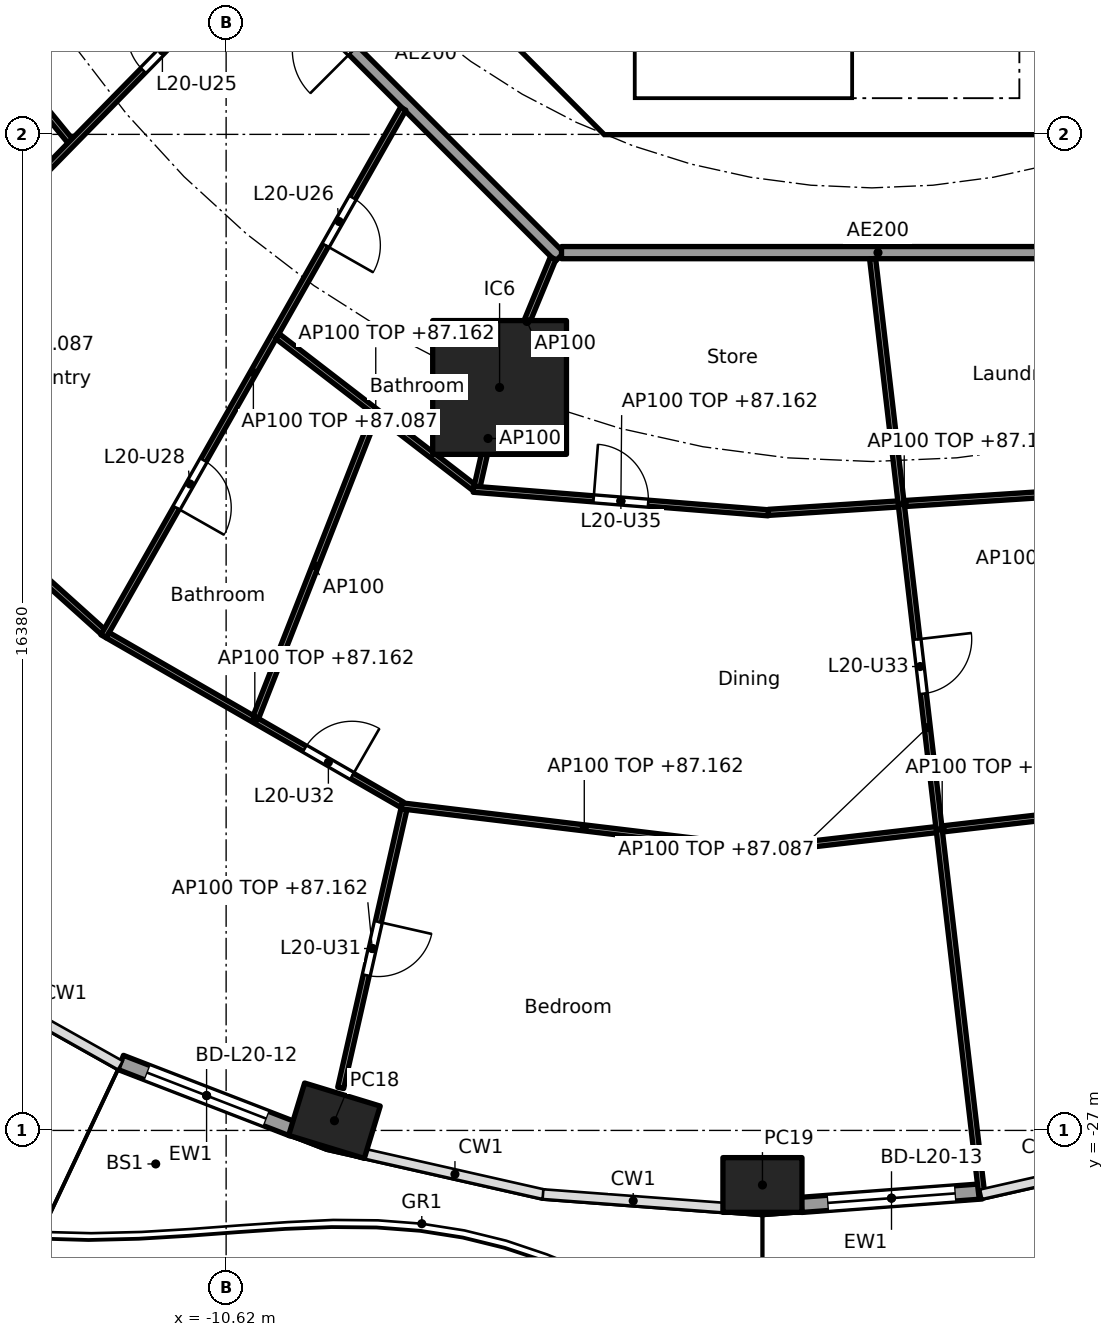
"""IFC4 building model, lengths in metres.
Left out: names, types, materials, properties, quantities, classifications, styles, units other than length and angle.
Written with IfcOpenShell. Run it as: python <this file> out.ifc"""

import sys

from ifc_helpers import new_model, si_unit, direction, frame, frame_2d, origin, origin_2d, place, context, subcontext, project, spatial, polyline, rectangle, hollow_rectangle, outline, extrude, element, fill, save


model = new_model("IFC4")
c1 = context("Model", 3, precision=1e-05, world=origin(), true_north=direction((0.0, 1.0)))
c2 = subcontext(c1, "Body", "Model", "MODEL_VIEW")
j1 = project(units=[si_unit("LENGTHUNIT", "METRE"), si_unit("PLANEANGLEUNIT", "RADIAN")], contexts=[c1])
p1 = place(None, origin())
s1 = spatial("IfcSite", under=j1, at=p1, CompositionType="ELEMENT")
p2 = place(p1, origin())
s2 = spatial("IfcBuilding", under=s1, at=p2, CompositionType="ELEMENT")
p3 = place(p2, frame((0.0, 0.0, 84.4)))
s3 = spatial("IfcBuildingStorey", under=s2, at=p3, CompositionType="ELEMENT", Elevation=84.4)
for number, where, z_axis, x_axis in (
    (1, (-8.839, -26.841, 0.0), (0.0, 0.0, 1.0), (0.957, -0.292, 0.0)),
    (2, (-1.8, -27.897, 0.0), (0.0, 0.0, 1.0), (1.0, 0.0, 0.0)),
):
    element("IfcColumn", number, at=place(p3, frame(where, z_axis=z_axis, x_axis=x_axis)), inside=s3, PredefinedType="COLUMN", context=c2, shape_type="SweptSolid", body=[
        extrude(hollow_rectangle(XDim=1.3, YDim=0.9, WallThickness=0.045, at=origin_2d()), origin(), (0.0, 0.0, 1.0), 3.7),
    ])
p4 = place(p3, frame((-6.123, -14.782, 0.0), z_axis=(0.0, 0.0, 1.0), x_axis=(1.0, 0.0, 0.0)))
e3 = element("IfcColumn", 3, at=p4, inside=s3, PredefinedType="COLUMN", context=c2, shape_type="SweptSolid", body=[
    extrude(rectangle(XDim=2.2, YDim=2.2, at=origin_2d()), origin(), (0.0, 0.0, 1.0), 3.7),
])
p5 = place(p3, frame((-9.529, -26.973, 0.0), z_axis=(0.0, 0.0, 1.0), x_axis=(-0.932827091302, 0.360324322982, 0.0)))
e4 = element("IfcWall", 4, at=p5, inside=s3, PredefinedType="SOLIDWALL", context=c2, shape_type="SweptSolid", body=[
    extrude(rectangle(XDim=3.027, YDim=0.25, at=frame_2d((1.514, 0.0))), origin(), (0.0, 0.0, 1.0), 3.44),
])
p6 = place(p5, frame((0.464, 0.0, 0.0)))
e5 = element("IfcOpeningElement", 5, at=p6, cuts=e4, PredefinedType="OPENING", context=c2, shape_type="SweptSolid", body=[
    extrude(rectangle(XDim=2.1, YDim=2.4, at=frame_2d((1.05, 1.2))), frame((0.0, 0.135, 0.0), z_axis=(0.0, -1.0, 0.0), x_axis=(1.0, 0.0, 0.0)), (0.0, 0.0, 1.0), 0.27),
])
p7 = place(p3, frame((1.806, -28.003, 0.0), z_axis=(0.0, 0.0, 1.0), x_axis=(-0.997226174467, -0.074430887117, 0.0)))
e6 = element("IfcWall", 6, at=p7, inside=s3, PredefinedType="SOLIDWALL", context=c2, shape_type="SweptSolid", body=[
    extrude(rectangle(XDim=2.975, YDim=0.25, at=frame_2d((1.488, 0.0))), origin(), (0.0, 0.0, 1.0), 3.44),
])
p8 = place(p7, frame((0.438, 0.0, 0.0)))
e7 = element("IfcOpeningElement", 7, at=p8, cuts=e6, PredefinedType="OPENING", context=c2, shape_type="SweptSolid", body=[
    extrude(rectangle(XDim=2.1, YDim=2.4, at=frame_2d((1.05, 1.2))), frame((0.0, 0.135, 0.0), z_axis=(0.0, -1.0, 0.0), x_axis=(1.0, 0.0, 0.0)), (0.0, 0.0, 1.0), 0.27),
])
p9 = place(p3, frame((-9.988, -4.613, 0.0), z_axis=(0.0, 0.0, 1.0), x_axis=(0.707106781187, -0.707106781187, 0.0)))
e8 = element("IfcWall", 8, at=p9, inside=s3, PredefinedType="SHEAR", context=c2, shape_type="SweptSolid", body=[
    extrude(rectangle(XDim=7.602, YDim=0.6, at=frame_2d((3.801, 0.0))), origin(), (0.0, 0.0, 1.0), 3.44),
])
p10 = place(p9, frame((6.151, 0.0, 0.0)))
e9 = element("IfcOpeningElement", 9, at=p10, cuts=e8, PredefinedType="OPENING", context=c2, shape_type="SweptSolid", body=[
    extrude(rectangle(XDim=1.1, YDim=2.1, at=frame_2d((0.55, 1.05))), frame((0.0, 0.31, 0.0), z_axis=(0.0, -1.0, 0.0), x_axis=(1.0, 0.0, 0.0)), (0.0, 0.0, 1.0), 0.62),
])
p11 = place(p3, origin())
e10 = element("IfcWall", 10, at=p11, inside=s3, PredefinedType="SHEAR", context=c2, shape_type="SweptSolid", body=[
    extrude(outline(polyline([(-4.152, -10.025), (4.152, -10.025), (4.401, -9.776), (4.825, -10.2), (4.401, -10.625), (-4.401, -10.625), (-4.825, -10.2), (-4.401, -9.776), (-4.152, -10.025)])), origin(), (0.0, 0.0, 1.0), 3.44),
])
p12 = place(p3, origin())
e11 = element("IfcWall", 11, at=p12, inside=s3, PredefinedType="SOLIDWALL", context=c2, shape_type="SweptSolid", body=[
    extrude(outline(polyline([(-3.9, -10.025), (-4.1, -10.025), (-4.1, -7.025), (-3.9, -7.025), (-3.9, -10.025)])), origin(), (0.0, 0.0, 1.0), 3.44),
])
p13 = place(p3, frame((-12.635, -5.134, 0.0), z_axis=(0.0, 0.0, 1.0), x_axis=(0.707106781187, -0.707106781187, 0.0)))
e12 = element("IfcWall", 12, at=p13, inside=s3, PredefinedType="PARTITIONING", context=c2, shape_type="SweptSolid", body=[
    extrude(rectangle(XDim=10.609, YDim=0.2, at=frame_2d((5.305, 0.0))), origin(), (0.0, 0.0, 1.0), 3.44),
])
p14 = place(p13, frame((4.804, 0.0, 0.0)))
e13 = element("IfcOpeningElement", 13, at=p14, cuts=e12, PredefinedType="OPENING", context=c2, shape_type="SweptSolid", body=[
    extrude(rectangle(XDim=1.0, YDim=2.1, at=frame_2d((0.5, 1.05))), frame((0.0, 0.11, 0.0), z_axis=(0.0, -1.0, 0.0), x_axis=(1.0, 0.0, 0.0)), (0.0, 0.0, 1.0), 0.22),
])
p15 = place(p3, frame((-5.104, -12.565, 0.0), z_axis=(0.0, 0.0, 1.0), x_axis=(1.0, 0.0, 0.0)))
e14 = element("IfcWall", 14, at=p15, inside=s3, PredefinedType="PARTITIONING", context=c2, shape_type="SweptSolid", body=[
    extrude(rectangle(XDim=10.409, YDim=0.2, at=frame_2d((5.205, 0.0))), origin(), (0.0, 0.0, 1.0), 3.44),
])
p16 = place(p3, frame((-16.182, -7.067, 0.0), z_axis=(0.0, 0.0, 1.0), x_axis=(0.633400832951, -0.773823871962, 0.0)))
e15 = element("IfcWall", 15, at=p16, inside=s3, PredefinedType="PARTITIONING", context=c2, shape_type="SweptSolid", body=[
    extrude(rectangle(XDim=4.729, YDim=0.1, at=frame_2d((2.365, 0.0))), origin(), (0.0, 0.0, 1.0), 2.762),
])
p17 = place(p3, frame((-10.181, -7.729, 0.0), z_axis=(0.0, 0.0, 1.0), x_axis=(-0.699708106083, -0.714428839201, 0.0)))
e16 = element("IfcWall", 16, at=p17, inside=s3, PredefinedType="PARTITIONING", context=c2, shape_type="SweptSolid", body=[
    extrude(rectangle(XDim=14.959, YDim=0.1, at=frame_2d((7.48, 0.0))), origin(), (0.0, 0.0, 1.0), 2.687),
])
p18 = place(p17, frame((1.675, 0.0, 0.0)))
e17 = element("IfcOpeningElement", 17, at=p18, cuts=e16, PredefinedType="OPENING", context=c2, shape_type="SweptSolid", body=[
    extrude(rectangle(XDim=0.9, YDim=2.1, at=frame_2d((0.45, 1.05))), frame((0.0, 0.06, 0.0), z_axis=(0.0, -1.0, 0.0), x_axis=(1.0, 0.0, 0.0)), (0.0, 0.0, 1.0), 0.12),
])
p19 = place(p17, frame((6.619, 0.0, 0.0)))
e18 = element("IfcOpeningElement", 18, at=p19, cuts=e16, PredefinedType="OPENING", context=c2, shape_type="SweptSolid", body=[
    extrude(rectangle(XDim=0.9, YDim=2.1, at=frame_2d((0.45, 1.05))), frame((0.0, 0.06, 0.0), z_axis=(0.0, -1.0, 0.0), x_axis=(1.0, 0.0, 0.0)), (0.0, 0.0, 1.0), 0.12),
])
p20 = place(p3, frame((-17.063, -14.827, 0.0), z_axis=(0.0, 0.0, 1.0), x_axis=(0.743478142868, -0.668760234373, 0.0)))
e19 = element("IfcWall", 19, at=p20, inside=s3, PredefinedType="PARTITIONING", context=c2, shape_type="SweptSolid", body=[
    extrude(rectangle(XDim=5.937, YDim=0.1, at=frame_2d((2.969, 0.0))), origin(), (0.0, 0.0, 1.0), 2.762),
])
p21 = place(p20, frame((2.519, 0.0, 0.0)))
e20 = element("IfcOpeningElement", 20, at=p21, cuts=e19, PredefinedType="OPENING", context=c2, shape_type="SweptSolid", body=[
    extrude(rectangle(XDim=0.9, YDim=2.1, at=frame_2d((0.45, 1.05))), frame((0.0, 0.06, 0.0), z_axis=(0.0, -1.0, 0.0), x_axis=(1.0, 0.0, 0.0)), (0.0, 0.0, 1.0), 0.12),
])
p22 = place(p3, frame((-7.707, -10.198, 0.0), z_axis=(0.0, 0.0, 1.0), x_axis=(-0.493963587489, -0.869482589955, 0.0)))
e21 = element("IfcWall", 21, at=p22, inside=s3, PredefinedType="PARTITIONING", context=c2, shape_type="SweptSolid", body=[
    extrude(rectangle(XDim=9.978, YDim=0.1, at=frame_2d((4.989, 0.0))), origin(), (0.0, 0.0, 1.0), 2.687),
])
p23 = place(p22, frame((1.684, 0.0, 0.0)))
e22 = element("IfcOpeningElement", 22, at=p23, cuts=e21, PredefinedType="OPENING", context=c2, shape_type="SweptSolid", body=[
    extrude(rectangle(XDim=0.9, YDim=2.1, at=frame_2d((0.45, 1.05))), frame((0.0, 0.06, 0.0), z_axis=(0.0, -1.0, 0.0), x_axis=(1.0, 0.0, 0.0)), (0.0, 0.0, 1.0), 0.12),
])
p24 = place(p22, frame((6.648, 0.0, 0.0)))
e23 = element("IfcOpeningElement", 23, at=p24, cuts=e21, PredefinedType="OPENING", context=c2, shape_type="SweptSolid", body=[
    extrude(rectangle(XDim=0.9, YDim=2.1, at=frame_2d((0.45, 1.05))), frame((0.0, 0.06, 0.0), z_axis=(0.0, -1.0, 0.0), x_axis=(1.0, 0.0, 0.0)), (0.0, 0.0, 1.0), 0.12),
])
p25 = place(p3, frame((-9.775, -13.939, 0.0), z_axis=(0.0, 0.0, 1.0), x_axis=(0.792156642473, -0.61031783014, 0.0)))
e24 = element("IfcWall", 24, at=p25, inside=s3, PredefinedType="PARTITIONING", context=c2, shape_type="SweptSolid", body=[
    extrude(rectangle(XDim=4.08, YDim=0.1, at=frame_2d((2.04, 0.0))), origin(), (0.0, 0.0, 1.0), 2.762),
])
p26 = place(p3, frame((-12.568, -18.856, 0.0), z_axis=(0.0, 0.0, 1.0), x_axis=(0.866532513598, -0.499120629585, 0.0)))
e25 = element("IfcWall", 25, at=p26, inside=s3, PredefinedType="PARTITIONING", context=c2, shape_type="SweptSolid", body=[
    extrude(rectangle(XDim=5.585, YDim=0.1, at=frame_2d((2.792, 0.0))), origin(), (0.0, 0.0, 1.0), 2.762),
])
p27 = place(p26, frame((3.739, 0.0, 0.0)))
e26 = element("IfcOpeningElement", 26, at=p27, cuts=e25, PredefinedType="OPENING", context=c2, shape_type="SweptSolid", body=[
    extrude(rectangle(XDim=0.9, YDim=2.1, at=frame_2d((0.45, 1.05))), frame((0.0, 0.06, 0.0), z_axis=(0.0, -1.0, 0.0), x_axis=(1.0, 0.0, 0.0)), (0.0, 0.0, 1.0), 0.12),
])
p28 = place(p3, frame((-8.177, -15.231, 0.0), z_axis=(0.0, 0.0, 1.0), x_axis=(-0.365520869553, -0.930803144559, 0.0)))
e27 = element("IfcWall", 27, at=p28, inside=s3, PredefinedType="PARTITIONING", context=c2, shape_type="SweptSolid", body=[
    extrude(rectangle(XDim=5.342, YDim=0.1, at=frame_2d((2.671, 0.0))), origin(), (0.0, 0.0, 1.0), 3.44),
])
p29 = place(p3, frame((-5.243, -12.657, 0.0), z_axis=(0.0, 0.0, 1.0), x_axis=(-0.382719158442, -0.923864733477, 0.0)))
e28 = element("IfcWall", 28, at=p29, inside=s3, PredefinedType="PARTITIONING", context=c2, shape_type="SweptSolid", body=[
    extrude(rectangle(XDim=2.25, YDim=0.1, at=frame_2d((1.125, 0.0))), origin(), (0.0, 0.0, 1.0), 3.44),
])
p30 = place(p3, frame((-6.134, -14.831, 0.0), z_axis=(0.0, 0.0, 1.0), x_axis=(-0.221269290858, -0.975212746493, 0.0)))
e29 = element("IfcWall", 29, at=p30, inside=s3, PredefinedType="PARTITIONING", context=c2, shape_type="SweptSolid", body=[
    extrude(rectangle(XDim=1.62, YDim=0.1, at=frame_2d((0.81, 0.0))), origin(), (0.0, 0.0, 1.0), 3.44),
])
p31 = place(p3, frame((-6.553, -16.456, 0.0), z_axis=(0.0, 0.0, 1.0), x_axis=(0.996817033118, -0.079723286975, 0.0)))
e30 = element("IfcWall", 30, at=p31, inside=s3, PredefinedType="PARTITIONING", context=c2, shape_type="SweptSolid", body=[
    extrude(rectangle(XDim=4.866, YDim=0.1, at=frame_2d((2.433, 0.0))), origin(), (0.0, 0.0, 1.0), 2.762),
])
p32 = place(p31, frame((1.983, 0.0, 0.0)))
e31 = element("IfcOpeningElement", 31, at=p32, cuts=e30, PredefinedType="OPENING", context=c2, shape_type="SweptSolid", body=[
    extrude(rectangle(XDim=0.9, YDim=2.1, at=frame_2d((0.45, 1.05))), frame((0.0, 0.06, 0.0), z_axis=(0.0, -1.0, 0.0), x_axis=(1.0, 0.0, 0.0)), (0.0, 0.0, 1.0), 0.12),
])
p33 = place(p3, frame((-7.696, -21.717, 0.0), z_axis=(0.0, 0.0, 1.0), x_axis=(-0.221196717441, -0.97522921008, 0.0)))
e32 = element("IfcWall", 32, at=p33, inside=s3, PredefinedType="PARTITIONING", context=c2, shape_type="SweptSolid", body=[
    extrude(rectangle(XDim=4.7, YDim=0.1, at=frame_2d((2.35, 0.0))), origin(), (0.0, 0.0, 1.0), 2.762),
])
p34 = place(p33, frame((1.9, 0.0, 0.0)))
e33 = element("IfcOpeningElement", 33, at=p34, cuts=e32, PredefinedType="OPENING", context=c2, shape_type="SweptSolid", body=[
    extrude(rectangle(XDim=0.9, YDim=2.1, at=frame_2d((0.45, 1.05))), frame((0.0, 0.06, 0.0), z_axis=(0.0, -1.0, 0.0), x_axis=(1.0, 0.0, 0.0)), (0.0, 0.0, 1.0), 0.12),
])
p35 = place(p3, frame((-7.735, -21.662, 0.0), z_axis=(0.0, 0.0, 1.0), x_axis=(0.992808347289, -0.119714600421, 0.0)))
e34 = element("IfcWall", 34, at=p35, inside=s3, PredefinedType="PARTITIONING", context=c2, shape_type="SweptSolid", body=[
    extrude(rectangle(XDim=6.053, YDim=0.1, at=frame_2d((3.026, 0.0))), origin(), (0.0, 0.0, 1.0), 2.762),
])
p36 = place(p3, frame((-1.703, -16.836, 0.0), z_axis=(0.0, 0.0, 1.0), x_axis=(0.997899919101, 0.064774620473, 0.0)))
e35 = element("IfcWall", 35, at=p36, inside=s3, PredefinedType="PARTITIONING", context=c2, shape_type="SweptSolid", body=[
    extrude(rectangle(XDim=4.478, YDim=0.1, at=frame_2d((2.239, 0.0))), origin(), (0.0, 0.0, 1.0), 2.762),
])
p37 = place(p3, frame((-1.726, -22.375, 0.0), z_axis=(0.0, 0.0, 1.0), x_axis=(0.993392336919, 0.114767874207, 0.0)))
e36 = element("IfcWall", 36, at=p37, inside=s3, PredefinedType="PARTITIONING", context=c2, shape_type="SweptSolid", body=[
    extrude(rectangle(XDim=5.801, YDim=0.1, at=frame_2d((2.9, 0.0))), origin(), (0.0, 0.0, 1.0), 2.762),
])
p38 = place(p3, frame((0.011, -12.664, 0.0), z_axis=(0.0, 0.0, 1.0), x_axis=(0.115841404661, -0.993267722704, 0.0)))
e37 = element("IfcWall", 37, at=p38, inside=s3, PredefinedType="PARTITIONING", context=c2, shape_type="SweptSolid", body=[
    extrude(rectangle(XDim=15.528, YDim=0.1, at=frame_2d((7.764, 0.0))), origin(), (0.0, 0.0, 1.0), 2.687),
])
p39 = place(p38, frame((6.303, 0.0, 0.0)))
e38 = element("IfcOpeningElement", 38, at=p39, cuts=e37, PredefinedType="OPENING", context=c2, shape_type="SweptSolid", body=[
    extrude(rectangle(XDim=0.9, YDim=2.1, at=frame_2d((0.45, 1.05))), frame((0.0, 0.06, 0.0), z_axis=(0.0, -1.0, 0.0), x_axis=(1.0, 0.0, 0.0)), (0.0, 0.0, 1.0), 0.12),
])
p40 = place(p6, origin())
e39 = element("IfcDoor", 39, at=p40, inside=s3, OperationType="SLIDING_TO_LEFT", PredefinedType="DOOR", context=c2, shape_type="SweptSolid", body=[
    extrude(rectangle(XDim=2.1, YDim=2.4, at=frame_2d((1.05, 1.2))), frame((0.0, 0.025, 0.0), z_axis=(0.0, -1.0, 0.0), x_axis=(1.0, 0.0, 0.0)), (0.0, 0.0, 1.0), 0.05),
])
fill(e5, e39)
p41 = place(p8, origin())
e40 = element("IfcDoor", 40, at=p41, inside=s3, OperationType="SLIDING_TO_LEFT", PredefinedType="DOOR", context=c2, shape_type="SweptSolid", body=[
    extrude(rectangle(XDim=2.1, YDim=2.4, at=frame_2d((1.05, 1.2))), frame((0.0, 0.025, 0.0), z_axis=(0.0, -1.0, 0.0), x_axis=(1.0, 0.0, 0.0)), (0.0, 0.0, 1.0), 0.05),
])
fill(e7, e40)
p42 = place(p10, origin())
e41 = element("IfcDoor", 41, at=p42, inside=s3, OperationType="SINGLE_SWING_LEFT", PredefinedType="DOOR", context=c2, shape_type="SweptSolid", body=[
    extrude(rectangle(XDim=1.1, YDim=2.1, at=frame_2d((0.55, 1.05))), frame((0.0, 0.025, 0.0), z_axis=(0.0, -1.0, 0.0), x_axis=(1.0, 0.0, 0.0)), (0.0, 0.0, 1.0), 0.05),
])
fill(e9, e41)
p43 = place(p18, frame((0.9, 0.0, 0.0), x_axis=(-1.0, 0.0, 0.0)))
e42 = element("IfcDoor", 42, at=p43, inside=s3, OperationType="SINGLE_SWING_RIGHT", PredefinedType="DOOR", context=c2, shape_type="SweptSolid", body=[
    extrude(rectangle(XDim=0.9, YDim=2.1, at=frame_2d((0.45, 1.05))), frame((0.0, 0.025, 0.0), z_axis=(0.0, -1.0, 0.0), x_axis=(1.0, 0.0, 0.0)), (0.0, 0.0, 1.0), 0.05),
])
fill(e17, e42)
p44 = place(p23, origin())
e43 = element("IfcDoor", 43, at=p44, inside=s3, OperationType="SINGLE_SWING_RIGHT", PredefinedType="DOOR", context=c2, shape_type="SweptSolid", body=[
    extrude(rectangle(XDim=0.9, YDim=2.1, at=frame_2d((0.45, 1.05))), frame((0.0, 0.025, 0.0), z_axis=(0.0, -1.0, 0.0), x_axis=(1.0, 0.0, 0.0)), (0.0, 0.0, 1.0), 0.05),
])
fill(e22, e43)
p45 = place(p24, origin())
e44 = element("IfcDoor", 44, at=p45, inside=s3, OperationType="SINGLE_SWING_RIGHT", PredefinedType="DOOR", context=c2, shape_type="SweptSolid", body=[
    extrude(rectangle(XDim=0.9, YDim=2.1, at=frame_2d((0.45, 1.05))), frame((0.0, 0.025, 0.0), z_axis=(0.0, -1.0, 0.0), x_axis=(1.0, 0.0, 0.0)), (0.0, 0.0, 1.0), 0.05),
])
fill(e23, e44)
p46 = place(p34, origin())
e45 = element("IfcDoor", 45, at=p46, inside=s3, OperationType="SINGLE_SWING_LEFT", PredefinedType="DOOR", context=c2, shape_type="SweptSolid", body=[
    extrude(rectangle(XDim=0.9, YDim=2.1, at=frame_2d((0.45, 1.05))), frame((0.0, 0.025, 0.0), z_axis=(0.0, -1.0, 0.0), x_axis=(1.0, 0.0, 0.0)), (0.0, 0.0, 1.0), 0.05),
])
fill(e33, e45)
p47 = place(p27, origin())
e46 = element("IfcDoor", 46, at=p47, inside=s3, OperationType="SINGLE_SWING_RIGHT", PredefinedType="DOOR", context=c2, shape_type="SweptSolid", body=[
    extrude(rectangle(XDim=0.9, YDim=2.1, at=frame_2d((0.45, 1.05))), frame((0.0, 0.025, 0.0), z_axis=(0.0, -1.0, 0.0), x_axis=(1.0, 0.0, 0.0)), (0.0, 0.0, 1.0), 0.05),
])
fill(e26, e46)
p48 = place(p39, origin())
e47 = element("IfcDoor", 47, at=p48, inside=s3, OperationType="SINGLE_SWING_LEFT", PredefinedType="DOOR", context=c2, shape_type="SweptSolid", body=[
    extrude(rectangle(XDim=0.9, YDim=2.1, at=frame_2d((0.45, 1.05))), frame((0.0, 0.025, 0.0), z_axis=(0.0, -1.0, 0.0), x_axis=(1.0, 0.0, 0.0)), (0.0, 0.0, 1.0), 0.05),
])
fill(e38, e47)
p49 = place(p32, origin())
e48 = element("IfcDoor", 48, at=p49, inside=s3, OperationType="SINGLE_SWING_LEFT", PredefinedType="DOOR", context=c2, shape_type="SweptSolid", body=[
    extrude(rectangle(XDim=0.9, YDim=2.1, at=frame_2d((0.45, 1.05))), frame((0.0, 0.025, 0.0), z_axis=(0.0, -1.0, 0.0), x_axis=(1.0, 0.0, 0.0)), (0.0, 0.0, 1.0), 0.05),
])
fill(e31, e48)
save(model, sys.argv[1])
